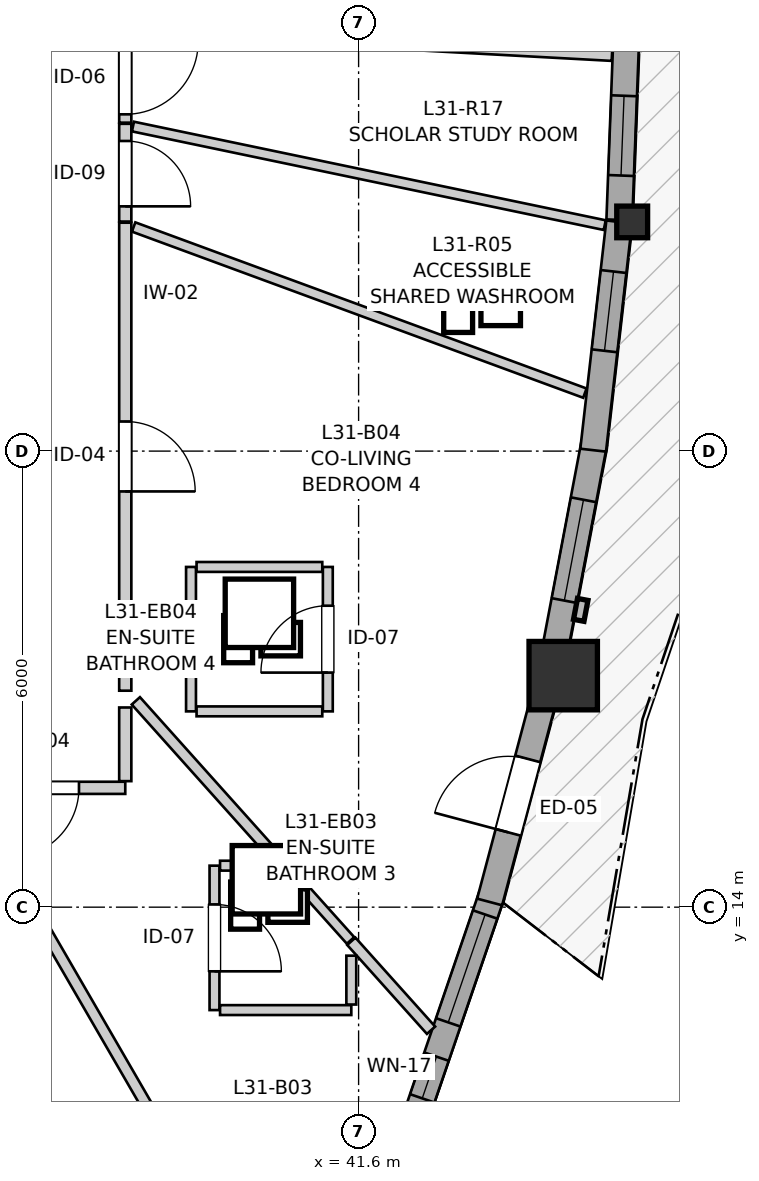
"""IFC4 building model, lengths in metres.
Left out: names, types, materials, properties, quantities, classifications, styles, units other than length and angle.
Written with IfcOpenShell. Run it as: python <this file> out.ifc"""

import sys

from ifc_helpers import new_model, si_unit, direction, frame, frame_2d, origin, origin_2d, place, context, subcontext, project, spatial, rectangle, i_section, extrude, source, transform, mapped, element, fill, save


model = new_model("IFC4")
c1 = context("Model", 3, precision=1e-05, world=origin(), true_north=direction((0.0, 1.0)))
c2 = subcontext(c1, "Body", "Model", "MODEL_VIEW")
j1 = project(units=[si_unit("LENGTHUNIT", "METRE"), si_unit("PLANEANGLEUNIT", "RADIAN")], contexts=[c1])
p1 = place(None, origin())
s1 = spatial("IfcSite", under=j1, at=p1, CompositionType="ELEMENT")
p2 = place(p1, origin())
s2 = spatial("IfcBuilding", under=s1, at=p2, CompositionType="ELEMENT")
p3 = place(p2, frame((0.0, 0.0, 105.6)))
s3 = spatial("IfcBuildingStorey", under=s2, at=p3, CompositionType="ELEMENT", Elevation=105.6)
m1 = source(origin(), c2, "Body", "SweptSolid", [
    extrude(rectangle(XDim=0.9, YDim=0.9, at=origin_2d()), origin(), (0.0, 0.0, 1.0), 2.935),
])
p4 = place(p3, frame((44.292, 17.046, 0.0), z_axis=(0.0, 0.0, 1.0), x_axis=(1.0, 0.0, 0.0)))
e1 = element("IfcColumn", 1, at=p4, inside=s3, PredefinedType="COLUMN", context=c2, shape_type="MappedRepresentation", body=[
    mapped(m1, transform((0.0, 0.0, 0.0), x_axis=(1.0, 0.0, 0.0), y_axis=(0.0, 1.0, 0.0), z_axis=(0.0, 0.0, 1.0), scale=1.0)),
])
m2 = source(origin(), c2, "Body", "SweptSolid", [
    extrude(i_section(OverallWidth=0.406, OverallDepth=0.416, WebThickness=0.027, FlangeThickness=0.044, FilletRadius=0.015, at=origin_2d()), origin(), (0.0, 0.0, 1.0), 2.935),
])
p5 = place(p3, frame((45.199, 23.015, 0.0), z_axis=(0.0, 0.0, 1.0), x_axis=(1.0, 0.0, 0.0)))
e2 = element("IfcColumn", 2, at=p5, inside=s3, PredefinedType="PILASTER", context=c2, shape_type="MappedRepresentation", body=[
    mapped(m2, transform((0.0, 0.0, 0.0), x_axis=(1.0, 0.0, 0.0), y_axis=(0.0, 1.0, 0.0), z_axis=(0.0, 0.0, 1.0), scale=1.0)),
])
p6 = place(p3, frame((42.323, 11.151, 0.0), z_axis=(0.0, 0.0, 1.0), x_axis=(0.323606092462, 0.94619189223, 0.0)))
e3 = element("IfcWall", 3, at=p6, inside=s3, PredefinedType="SOLIDWALL", context=c2, shape_type="SweptSolid", body=[
    extrude(rectangle(XDim=3.172, YDim=0.34, at=frame_2d((1.586, 0.0))), origin(), (0.0, 0.0, 1.0), 2.465),
])
p7 = place(p6, frame((0.353, 0.0, 0.82)))
e4 = element("IfcOpeningElement", 4, at=p7, cuts=e3, PredefinedType="OPENING", context=c2, shape_type="SweptSolid", body=[
    extrude(rectangle(XDim=0.58, YDim=1.35, at=frame_2d((0.29, 0.675))), frame((0.0, 0.18, 0.0), z_axis=(0.0, -1.0, 0.0), x_axis=(1.0, 0.0, 0.0)), (0.0, 0.0, 1.0), 0.36),
])
p8 = place(p6, frame((1.41, 0.0, 0.82)))
e5 = element("IfcOpeningElement", 5, at=p8, cuts=e3, PredefinedType="OPENING", context=c2, shape_type="SweptSolid", body=[
    extrude(rectangle(XDim=1.5, YDim=1.45, at=frame_2d((0.75, 0.725))), frame((0.0, 0.18, 0.0), z_axis=(0.0, -1.0, 0.0), x_axis=(1.0, 0.0, 0.0)), (0.0, 0.0, 1.0), 0.36),
])
p9 = place(p3, frame((43.324, 14.068, 0.0), z_axis=(0.0, 0.0, 1.0), x_axis=(0.257085513118, 0.966388658328, 0.0)))
e6 = element("IfcWall", 6, at=p9, inside=s3, PredefinedType="SOLIDWALL", context=c2, shape_type="SweptSolid", body=[
    extrude(rectangle(XDim=2.896, YDim=0.34, at=frame_2d((1.448, 0.0))), origin(), (0.0, 0.0, 1.0), 2.465),
])
p10 = place(p9, frame((0.948, 0.0, 0.0)))
e7 = element("IfcOpeningElement", 7, at=p10, cuts=e6, PredefinedType="OPENING", context=c2, shape_type="SweptSolid", body=[
    extrude(rectangle(XDim=1.0, YDim=2.1, at=frame_2d((0.5, 1.05))), frame((0.0, 0.18, 0.0), z_axis=(0.0, -1.0, 0.0), x_axis=(1.0, 0.0, 0.0)), (0.0, 0.0, 1.0), 0.36),
])
p11 = place(p3, frame((44.168, 17.304, 0.0), z_axis=(0.0, 0.0, 1.0), x_axis=(0.186654850509, 0.982425552793, 0.0)))
e8 = element("IfcWall", 8, at=p11, inside=s3, PredefinedType="SOLIDWALL", context=c2, shape_type="SweptSolid", body=[
    extrude(rectangle(XDim=2.846, YDim=0.34, at=frame_2d((1.423, 0.0))), origin(), (0.0, 0.0, 1.0), 2.465),
])
p12 = place(p11, frame((0.743, 0.0, 0.82)))
e9 = element("IfcOpeningElement", 9, at=p12, cuts=e8, PredefinedType="OPENING", context=c2, shape_type="SweptSolid", body=[
    extrude(rectangle(XDim=1.35, YDim=1.45, at=frame_2d((0.675, 0.725))), frame((0.0, 0.18, 0.0), z_axis=(0.0, -1.0, 0.0), x_axis=(1.0, 0.0, 0.0)), (0.0, 0.0, 1.0), 0.36),
])
p13 = place(p3, frame((44.686, 20.012, 0.0), z_axis=(0.0, 0.0, 1.0), x_axis=(0.113268604106, 0.993564403209, 0.0)))
e10 = element("IfcWall", 10, at=p13, inside=s3, PredefinedType="SOLIDWALL", context=c2, shape_type="SweptSolid", body=[
    extrude(rectangle(XDim=3.022, YDim=0.34, at=frame_2d((1.511, 0.0))), origin(), (0.0, 0.0, 1.0), 2.465),
])
p14 = place(p13, frame((1.316, 0.0, 0.82)))
e11 = element("IfcOpeningElement", 11, at=p14, cuts=e10, PredefinedType="OPENING", context=c2, shape_type="SweptSolid", body=[
    extrude(rectangle(XDim=1.05, YDim=1.45, at=frame_2d((0.525, 0.725))), frame((0.0, 0.18, 0.0), z_axis=(0.0, -1.0, 0.0), x_axis=(1.0, 0.0, 0.0)), (0.0, 0.0, 1.0), 0.36),
])
p15 = place(p3, frame((45.031, 23.042, 0.0), z_axis=(0.0, 0.0, 1.0), x_axis=(0.037943223979, 0.999279896603, 0.0)))
e12 = element("IfcWall", 12, at=p15, inside=s3, PredefinedType="SOLIDWALL", context=c2, shape_type="SweptSolid", body=[
    extrude(rectangle(XDim=3.005, YDim=0.34, at=frame_2d((1.502, 0.0))), origin(), (0.0, 0.0, 1.0), 2.465),
])
p16 = place(p15, frame((0.584, 0.0, 0.82)))
e13 = element("IfcOpeningElement", 13, at=p16, cuts=e12, PredefinedType="OPENING", context=c2, shape_type="SweptSolid", body=[
    extrude(rectangle(XDim=1.05, YDim=1.45, at=frame_2d((0.525, 0.725))), frame((0.0, 0.18, 0.0), z_axis=(0.0, -1.0, 0.0), x_axis=(1.0, 0.0, 0.0)), (0.0, 0.0, 1.0), 0.36),
])
p17 = place(p3, frame((38.53, 23.005, 0.0), z_axis=(0.0, 0.0, 1.0), x_axis=(0.0, -1.0, 0.0)))
e14 = element("IfcWall", 14, at=p17, inside=s3, PredefinedType="PARTITIONING", context=c2, shape_type="SweptSolid", body=[
    extrude(rectangle(XDim=6.157, YDim=0.16, at=frame_2d((3.079, 0.0))), origin(), (0.0, 0.0, 1.0), 2.935),
])
p18 = place(p17, frame((2.615, 0.0, 0.0)))
e15 = element("IfcOpeningElement", 15, at=p18, cuts=e14, PredefinedType="OPENING", context=c2, shape_type="SweptSolid", body=[
    extrude(rectangle(XDim=0.92, YDim=2.1, at=frame_2d((0.46, 1.05))), frame((0.0, 0.09, 0.0), z_axis=(0.0, -1.0, 0.0), x_axis=(1.0, 0.0, 0.0)), (0.0, 0.0, 1.0), 0.18),
])
p19 = place(p3, frame((38.53, 15.57, 0.0), z_axis=(0.0, 0.0, 1.0), x_axis=(-1.0, 0.0, 0.0)))
e16 = element("IfcWall", 16, at=p19, inside=s3, PredefinedType="PARTITIONING", context=c2, shape_type="SweptSolid", body=[
    extrude(rectangle(XDim=2.156, YDim=0.16, at=frame_2d((1.078, 0.0))), origin(), (0.0, 0.0, 1.0), 2.935),
])
p20 = place(p19, frame((0.609, 0.0, 0.0)))
e17 = element("IfcOpeningElement", 17, at=p20, cuts=e16, PredefinedType="OPENING", context=c2, shape_type="SweptSolid", body=[
    extrude(rectangle(XDim=0.92, YDim=2.1, at=frame_2d((0.46, 1.05))), frame((0.0, 0.09, 0.0), z_axis=(0.0, -1.0, 0.0), x_axis=(1.0, 0.0, 0.0)), (0.0, 0.0, 1.0), 0.18),
])
p21 = place(p3, frame((39.704, 14.546, 0.0), z_axis=(0.0, 0.0, 1.0), x_axis=(0.0, -1.0, 0.0)))
e18 = element("IfcWall", 18, at=p21, inside=s3, PredefinedType="PARTITIONING", context=c2, shape_type="SweptSolid", body=[
    extrude(rectangle(XDim=1.9, YDim=0.13, at=frame_2d((0.95, 0.0))), origin(), (0.0, 0.0, 1.0), 2.935),
])
p22 = place(p21, frame((0.51, 0.0, 0.0)))
e19 = element("IfcOpeningElement", 19, at=p22, cuts=e18, PredefinedType="OPENING", context=c2, shape_type="SweptSolid", body=[
    extrude(rectangle(XDim=0.88, YDim=2.05, at=frame_2d((0.44, 1.025))), frame((0.0, 0.075, 0.0), z_axis=(0.0, -1.0, 0.0), x_axis=(1.0, 0.0, 0.0)), (0.0, 0.0, 1.0), 0.15),
])
p23 = place(p3, frame((41.195, 16.576, 0.0), z_axis=(0.0, 0.0, 1.0), x_axis=(0.0, 1.0, 0.0)))
e20 = element("IfcWall", 20, at=p23, inside=s3, PredefinedType="PARTITIONING", context=c2, shape_type="SweptSolid", body=[
    extrude(rectangle(XDim=1.9, YDim=0.13, at=frame_2d((0.95, 0.0))), origin(), (0.0, 0.0, 1.0), 2.935),
])
p24 = place(p23, frame((0.51, 0.0, 0.0)))
e21 = element("IfcOpeningElement", 21, at=p24, cuts=e20, PredefinedType="OPENING", context=c2, shape_type="SweptSolid", body=[
    extrude(rectangle(XDim=0.88, YDim=2.05, at=frame_2d((0.44, 1.025))), frame((0.0, 0.075, 0.0), z_axis=(0.0, -1.0, 0.0), x_axis=(1.0, 0.0, 0.0)), (0.0, 0.0, 1.0), 0.15),
])
p25 = place(p3, frame((38.53, 24.306, 0.0), z_axis=(0.0, 0.0, 1.0), x_axis=(0.0, -1.0, 0.0)))
e22 = element("IfcWall", 22, at=p25, inside=s3, PredefinedType="PARTITIONING", context=c2, shape_type="SweptSolid", body=[
    extrude(rectangle(XDim=1.286, YDim=0.16, at=frame_2d((0.643, 0.0))), origin(), (0.0, 0.0, 1.0), 2.935),
])
p26 = place(p25, frame((0.226, 0.0, 0.0)))
e23 = element("IfcOpeningElement", 23, at=p26, cuts=e22, PredefinedType="OPENING", context=c2, shape_type="SweptSolid", body=[
    extrude(rectangle(XDim=0.86, YDim=2.05, at=frame_2d((0.43, 1.025))), frame((0.0, 0.09, 0.0), z_axis=(0.0, -1.0, 0.0), x_axis=(1.0, 0.0, 0.0)), (0.0, 0.0, 1.0), 0.18),
])
p27 = place(p3, frame((38.53, 25.525, 0.0), z_axis=(0.0, 0.0, 1.0), x_axis=(0.0, -1.0, 0.0)))
e24 = element("IfcWall", 24, at=p27, inside=s3, PredefinedType="PARTITIONING", context=c2, shape_type="SweptSolid", body=[
    extrude(rectangle(XDim=1.204, YDim=0.16, at=frame_2d((0.602, 0.0))), origin(), (0.0, 0.0, 1.0), 2.935),
])
p28 = place(p27, frame((0.134, 0.0, 0.0)))
e25 = element("IfcOpeningElement", 25, at=p28, cuts=e24, PredefinedType="OPENING", context=c2, shape_type="SweptSolid", body=[
    extrude(rectangle(XDim=0.96, YDim=2.1, at=frame_2d((0.48, 1.05))), frame((0.0, 0.09, 0.0), z_axis=(0.0, -1.0, 0.0), x_axis=(1.0, 0.0, 0.0)), (0.0, 0.0, 1.0), 0.18),
])
p29 = place(p3, frame((34.4, 15.457, 0.0), z_axis=(0.0, 0.0, 1.0), x_axis=(0.358586620169, -0.933496457324, 0.0)))
e26 = element("IfcWall", 26, at=p29, inside=s3, PredefinedType="PARTITIONING", context=c2, shape_type="SweptSolid", body=[
    extrude(rectangle(XDim=10.256, YDim=0.145, at=frame_2d((5.128, 0.0))), origin(), (0.0, 0.0, 1.0), 2.935),
])
p30 = place(p3, frame((36.463, 15.447, 0.0), z_axis=(0.0, 0.0, 1.0), x_axis=(0.501201369888, -0.86533068062, 0.0)))
e27 = element("IfcWall", 27, at=p30, inside=s3, PredefinedType="PARTITIONING", context=c2, shape_type="SweptSolid", body=[
    extrude(rectangle(XDim=8.918, YDim=0.145, at=frame_2d((4.459, 0.0))), origin(), (0.0, 0.0, 1.0), 2.935),
])
p31 = place(p3, frame((38.64, 22.948, 0.0), z_axis=(0.0, 0.0, 1.0), x_axis=(0.938426101424, -0.3454800315, 0.0)))
e28 = element("IfcWall", 28, at=p31, inside=s3, PredefinedType="PARTITIONING", context=c2, shape_type="SweptSolid", body=[
    extrude(rectangle(XDim=6.327, YDim=0.13, at=frame_2d((3.164, 0.0))), origin(), (0.0, 0.0, 1.0), 2.935),
])
p32 = place(p3, frame((38.631, 24.27, 0.0), z_axis=(0.0, 0.0, 1.0), x_axis=(0.978856283814, -0.204549201019, 0.0)))
e29 = element("IfcWall", 29, at=p32, inside=s3, PredefinedType="PARTITIONING", context=c2, shape_type="SweptSolid", body=[
    extrude(rectangle(XDim=6.341, YDim=0.13, at=frame_2d((3.171, 0.0))), origin(), (0.0, 0.0, 1.0), 2.935),
])
p33 = place(p3, frame((38.622, 25.55, 0.0), z_axis=(0.0, 0.0, 1.0), x_axis=(0.998518036703, -0.054421782211, 0.0)))
e30 = element("IfcWall", 30, at=p33, inside=s3, PredefinedType="PARTITIONING", context=c2, shape_type="SweptSolid", body=[
    extrude(rectangle(XDim=6.321, YDim=0.145, at=frame_2d((3.16, 0.0))), origin(), (0.0, 0.0, 1.0), 2.935),
])
p34 = place(p3, frame((38.669, 16.715, 0.0), z_axis=(0.0, 0.0, 1.0), x_axis=(0.667262858083, -0.744822313188, 0.0)))
e31 = element("IfcWall", 31, at=p34, inside=s3, PredefinedType="PARTITIONING", context=c2, shape_type="SweptSolid", body=[
    extrude(rectangle(XDim=2.912, YDim=0.145, at=frame_2d((1.456, 0.0))), origin(), (0.0, 0.0, 1.0), 2.935),
])
p35 = place(p3, frame((39.395, 16.576, 0.0), z_axis=(0.0, 0.0, 1.0), x_axis=(0.0, 1.0, 0.0)))
e32 = element("IfcWall", 32, at=p35, inside=s3, PredefinedType="PARTITIONING", context=c2, shape_type="SweptSolid", body=[
    extrude(rectangle(XDim=1.9, YDim=0.13, at=frame_2d((0.95, 0.0))), origin(), (0.0, 0.0, 1.0), 2.935),
])
p36 = place(p3, frame((39.777, 12.646, 0.0), z_axis=(0.0, 0.0, 1.0), x_axis=(1.0, 0.0, 0.0)))
e33 = element("IfcWall", 33, at=p36, inside=s3, PredefinedType="PARTITIONING", context=c2, shape_type="SweptSolid", body=[
    extrude(rectangle(XDim=1.727, YDim=0.13, at=frame_2d((0.863, 0.0))), origin(), (0.0, 0.0, 1.0), 2.935),
])
for number, where, z_axis, x_axis in (
    (34, (39.468, 18.476, 0.0), (0.0, 0.0, 1.0), (1.0, 0.0, 0.0)),
    (35, (39.468, 16.576, 0.0), (0.0, 0.0, 1.0), (1.0, 0.0, 0.0)),
):
    element("IfcWall", number, at=place(p3, frame(where, z_axis=z_axis, x_axis=x_axis)), inside=s3, PredefinedType="PARTITIONING", context=c2, shape_type="SweptSolid", body=[
        extrude(rectangle(XDim=1.654, YDim=0.13, at=frame_2d((0.827, 0.0))), origin(), (0.0, 0.0, 1.0), 2.935),
    ])
p37 = place(p3, frame((41.504, 13.551, 0.0), z_axis=(0.0, 0.0, 1.0), x_axis=(0.667530166935, -0.744582753112, 0.0)))
e36 = element("IfcWall", 36, at=p37, inside=s3, PredefinedType="PARTITIONING", context=c2, shape_type="SweptSolid", body=[
    extrude(rectangle(XDim=1.572, YDim=0.145, at=frame_2d((0.786, 0.0))), origin(), (0.0, 0.0, 1.0), 2.935),
])
p38 = place(p3, frame((40.622, 14.535, 0.0), z_axis=(0.0, 0.0, 1.0), x_axis=(0.667455683483, -0.744649521981, 0.0)))
e37 = element("IfcWall", 37, at=p38, inside=s3, PredefinedType="PARTITIONING", context=c2, shape_type="SweptSolid", body=[
    extrude(rectangle(XDim=1.306, YDim=0.13, at=frame_2d((0.653, 0.0))), origin(), (0.0, 0.0, 1.0), 2.935),
])
p39 = place(p3, frame((38.53, 15.658, 0.0), z_axis=(0.0, 0.0, 1.0), x_axis=(0.0, 1.0, 0.0)))
e38 = element("IfcWall", 38, at=p39, inside=s3, PredefinedType="PARTITIONING", context=c2, shape_type="SweptSolid", body=[
    extrude(rectangle(XDim=0.969, YDim=0.16, at=frame_2d((0.484, 0.0))), origin(), (0.0, 0.0, 1.0), 2.935),
])
p40 = place(p3, frame((39.777, 14.546, 0.0), z_axis=(0.0, 0.0, 1.0), x_axis=(1.0, 0.0, 0.0)))
e39 = element("IfcWall", 39, at=p40, inside=s3, PredefinedType="PARTITIONING", context=c2, shape_type="SweptSolid", body=[
    extrude(rectangle(XDim=0.671, YDim=0.13, at=frame_2d((0.336, 0.0))), origin(), (0.0, 0.0, 1.0), 2.935),
])
p41 = place(p3, frame((41.504, 12.719, 0.0), z_axis=(0.0, 0.0, 1.0), x_axis=(0.0, 1.0, 0.0)))
e40 = element("IfcWall", 40, at=p41, inside=s3, PredefinedType="PARTITIONING", context=c2, shape_type="SweptSolid", body=[
    extrude(rectangle(XDim=0.643, YDim=0.13, at=frame_2d((0.321, 0.0))), origin(), (0.0, 0.0, 1.0), 2.935),
])
m3 = source(origin(), c2, "Body", "SweptSolid", [
    extrude(rectangle(XDim=0.58, YDim=1.35, at=frame_2d((0.29, 0.675))), frame((0.0, 0.03, 0.0), z_axis=(0.0, -1.0, 0.0), x_axis=(1.0, 0.0, 0.0)), (0.0, 0.0, 1.0), 0.06),
])
p42 = place(p7, origin())
e41 = element("IfcWindow", 41, at=p42, inside=s3, PartitioningType="SINGLE_PANEL", PredefinedType="WINDOW", context=c2, shape_type="MappedRepresentation", body=[
    mapped(m3, transform((0.0, 0.0, 0.0), x_axis=(1.0, 0.0, 0.0), y_axis=(0.0, 1.0, 0.0), z_axis=(0.0, 0.0, 1.0), scale=1.0)),
])
fill(e4, e41)
m4 = source(origin(), c2, "Body", "SweptSolid", [
    extrude(rectangle(XDim=1.5, YDim=1.45, at=frame_2d((0.75, 0.725))), frame((0.0, 0.03, 0.0), z_axis=(0.0, -1.0, 0.0), x_axis=(1.0, 0.0, 0.0)), (0.0, 0.0, 1.0), 0.06),
])
p43 = place(p8, origin())
e42 = element("IfcWindow", 42, at=p43, inside=s3, PartitioningType="SINGLE_PANEL", PredefinedType="WINDOW", context=c2, shape_type="MappedRepresentation", body=[
    mapped(m4, transform((0.0, 0.0, 0.0), x_axis=(1.0, 0.0, 0.0), y_axis=(0.0, 1.0, 0.0), z_axis=(0.0, 0.0, 1.0), scale=1.0)),
])
fill(e5, e42)
m5 = source(origin(), c2, "Body", "SweptSolid", [
    extrude(rectangle(XDim=1.35, YDim=1.45, at=frame_2d((0.675, 0.725))), frame((0.0, 0.03, 0.0), z_axis=(0.0, -1.0, 0.0), x_axis=(1.0, 0.0, 0.0)), (0.0, 0.0, 1.0), 0.06),
])
p44 = place(p12, origin())
e43 = element("IfcWindow", 43, at=p44, inside=s3, PartitioningType="SINGLE_PANEL", PredefinedType="WINDOW", context=c2, shape_type="MappedRepresentation", body=[
    mapped(m5, transform((0.0, 0.0, 0.0), x_axis=(1.0, 0.0, 0.0), y_axis=(0.0, 1.0, 0.0), z_axis=(0.0, 0.0, 1.0), scale=1.0)),
])
fill(e9, e43)
m6 = source(origin(), c2, "Body", "SweptSolid", [
    extrude(rectangle(XDim=1.05, YDim=1.45, at=frame_2d((0.525, 0.725))), frame((0.0, 0.03, 0.0), z_axis=(0.0, -1.0, 0.0), x_axis=(1.0, 0.0, 0.0)), (0.0, 0.0, 1.0), 0.06),
])
p45 = place(p14, origin())
e44 = element("IfcWindow", 44, at=p45, inside=s3, PartitioningType="SINGLE_PANEL", PredefinedType="WINDOW", context=c2, shape_type="MappedRepresentation", body=[
    mapped(m6, transform((0.0, 0.0, 0.0), x_axis=(1.0, 0.0, 0.0), y_axis=(0.0, 1.0, 0.0), z_axis=(0.0, 0.0, 1.0), scale=1.0)),
])
fill(e11, e44)
p46 = place(p16, origin())
e45 = element("IfcWindow", 45, at=p46, inside=s3, PartitioningType="SINGLE_PANEL", PredefinedType="WINDOW", context=c2, shape_type="MappedRepresentation", body=[
    mapped(m6, transform((0.0, 0.0, 0.0), x_axis=(1.0, 0.0, 0.0), y_axis=(0.0, 1.0, 0.0), z_axis=(0.0, 0.0, 1.0), scale=1.0)),
])
fill(e13, e45)
m7 = source(origin(), c2, "Body", "SweptSolid", [
    extrude(rectangle(XDim=1.0, YDim=2.1, at=frame_2d((0.5, 1.05))), frame((0.0, 0.025, 0.0), z_axis=(0.0, -1.0, 0.0), x_axis=(1.0, 0.0, 0.0)), (0.0, 0.0, 1.0), 0.05),
])
p47 = place(p10, origin())
e46 = element("IfcDoor", 46, at=p47, inside=s3, OperationType="SINGLE_SWING_LEFT", PredefinedType="DOOR", context=c2, shape_type="MappedRepresentation", body=[
    mapped(m7, transform((0.0, 0.0, 0.0), x_axis=(1.0, 0.0, 0.0), y_axis=(0.0, 1.0, 0.0), z_axis=(0.0, 0.0, 1.0), scale=1.0)),
])
fill(e7, e46)
m8 = source(origin(), c2, "Body", "SweptSolid", [
    extrude(rectangle(XDim=0.92, YDim=2.1, at=frame_2d((0.46, 1.05))), frame((0.0, 0.025, 0.0), z_axis=(0.0, -1.0, 0.0), x_axis=(1.0, 0.0, 0.0)), (0.0, 0.0, 1.0), 0.05),
])
p48 = place(p18, origin())
e47 = element("IfcDoor", 47, at=p48, inside=s3, OperationType="SINGLE_SWING_RIGHT", PredefinedType="DOOR", context=c2, shape_type="MappedRepresentation", body=[
    mapped(m8, transform((0.0, 0.0, 0.0), x_axis=(1.0, 0.0, 0.0), y_axis=(0.0, 1.0, 0.0), z_axis=(0.0, 0.0, 1.0), scale=1.0)),
])
fill(e15, e47)
p49 = place(p20, origin())
e48 = element("IfcDoor", 48, at=p49, inside=s3, OperationType="SINGLE_SWING_RIGHT", PredefinedType="DOOR", context=c2, shape_type="MappedRepresentation", body=[
    mapped(m8, transform((0.0, 0.0, 0.0), x_axis=(1.0, 0.0, 0.0), y_axis=(0.0, 1.0, 0.0), z_axis=(0.0, 0.0, 1.0), scale=1.0)),
])
fill(e17, e48)
m9 = source(origin(), c2, "Body", "SweptSolid", [
    extrude(rectangle(XDim=0.88, YDim=2.05, at=frame_2d((0.44, 1.025))), frame((0.0, 0.025, 0.0), z_axis=(0.0, -1.0, 0.0), x_axis=(1.0, 0.0, 0.0)), (0.0, 0.0, 1.0), 0.05),
])
p50 = place(p22, origin())
e49 = element("IfcDoor", 49, at=p50, inside=s3, OperationType="SINGLE_SWING_RIGHT", PredefinedType="DOOR", context=c2, shape_type="MappedRepresentation", body=[
    mapped(m9, transform((0.0, 0.0, 0.0), x_axis=(1.0, 0.0, 0.0), y_axis=(0.0, 1.0, 0.0), z_axis=(0.0, 0.0, 1.0), scale=1.0)),
])
fill(e19, e49)
p51 = place(p24, origin())
e50 = element("IfcDoor", 50, at=p51, inside=s3, OperationType="SINGLE_SWING_LEFT", PredefinedType="DOOR", context=c2, shape_type="MappedRepresentation", body=[
    mapped(m9, transform((0.0, 0.0, 0.0), x_axis=(1.0, 0.0, 0.0), y_axis=(0.0, 1.0, 0.0), z_axis=(0.0, 0.0, 1.0), scale=1.0)),
])
fill(e21, e50)
m10 = source(origin(), c2, "Body", "SweptSolid", [
    extrude(rectangle(XDim=0.86, YDim=2.05, at=frame_2d((0.43, 1.025))), frame((0.0, 0.025, 0.0), z_axis=(0.0, -1.0, 0.0), x_axis=(1.0, 0.0, 0.0)), (0.0, 0.0, 1.0), 0.05),
])
p52 = place(p26, origin())
e51 = element("IfcDoor", 51, at=p52, inside=s3, OperationType="SINGLE_SWING_RIGHT", PredefinedType="DOOR", context=c2, shape_type="MappedRepresentation", body=[
    mapped(m10, transform((0.0, 0.0, 0.0), x_axis=(1.0, 0.0, 0.0), y_axis=(0.0, 1.0, 0.0), z_axis=(0.0, 0.0, 1.0), scale=1.0)),
])
fill(e23, e51)
m11 = source(origin(), c2, "Body", "SweptSolid", [
    extrude(rectangle(XDim=0.96, YDim=2.1, at=frame_2d((0.48, 1.05))), frame((0.0, 0.025, 0.0), z_axis=(0.0, -1.0, 0.0), x_axis=(1.0, 0.0, 0.0)), (0.0, 0.0, 1.0), 0.05),
])
p53 = place(p28, origin())
e52 = element("IfcDoor", 52, at=p53, inside=s3, OperationType="SINGLE_SWING_LEFT", PredefinedType="DOOR", context=c2, shape_type="MappedRepresentation", body=[
    mapped(m11, transform((0.0, 0.0, 0.0), x_axis=(1.0, 0.0, 0.0), y_axis=(0.0, 1.0, 0.0), z_axis=(0.0, 0.0, 1.0), scale=1.0)),
])
fill(e25, e52)
save(model, sys.argv[1])
